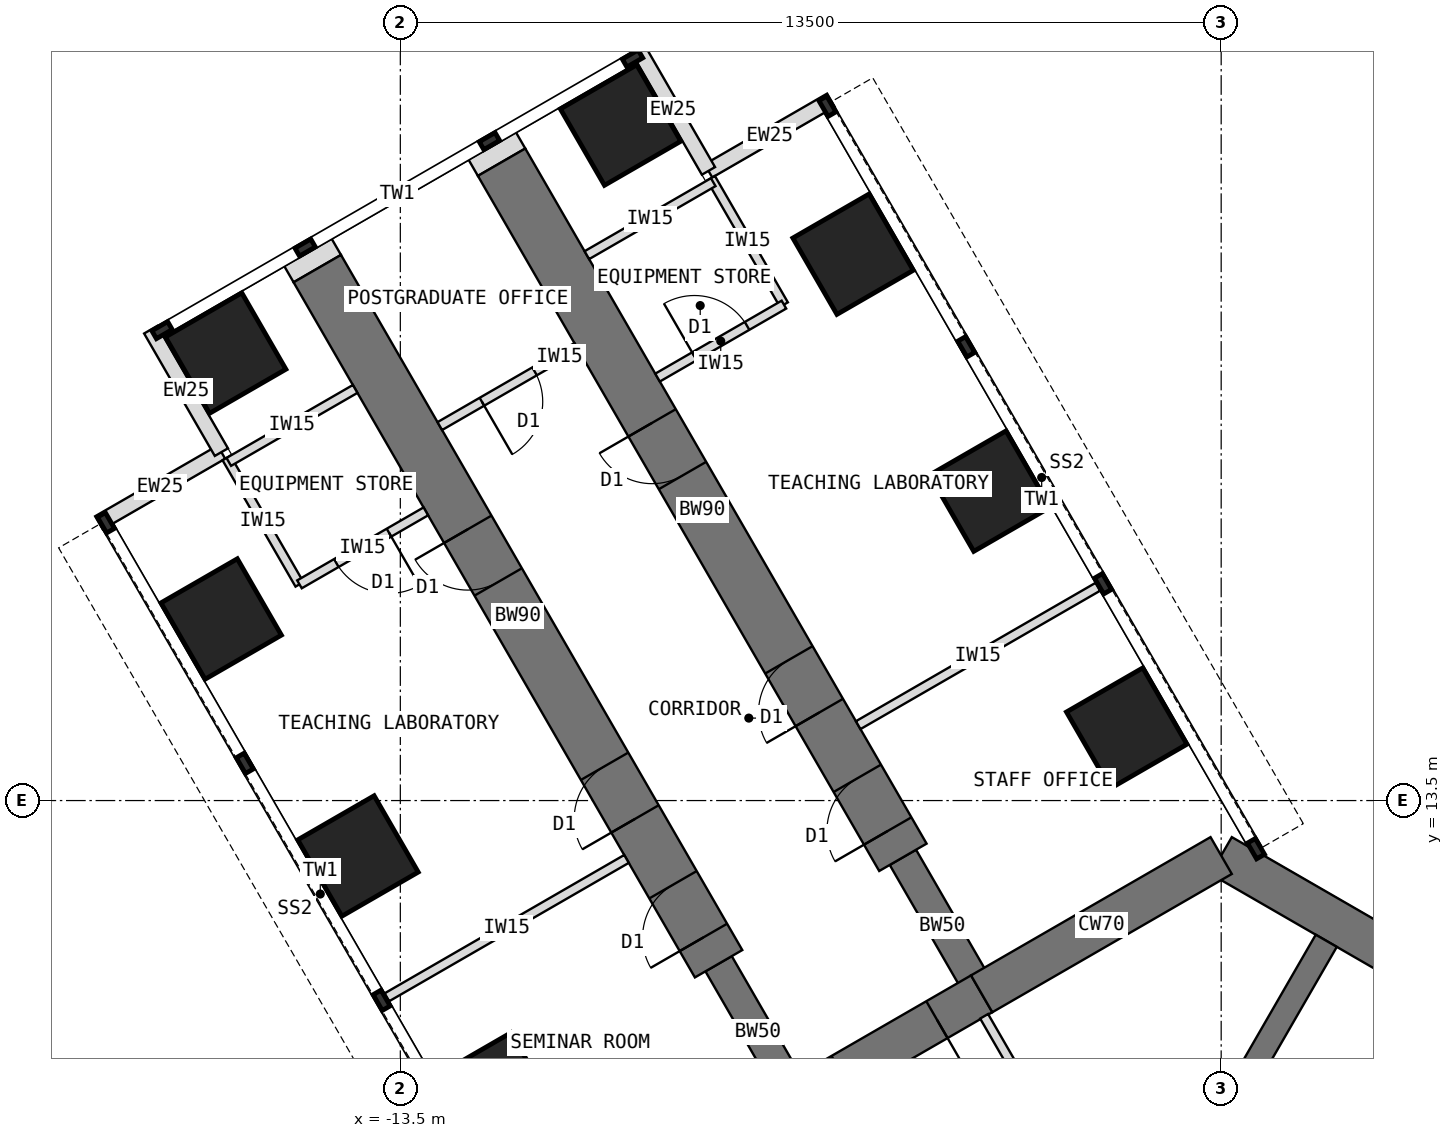
"""IFC4 building model, lengths in metres.
Left out: names, types, materials, properties, quantities, classifications, styles, units other than length and angle.
Written with IfcOpenShell. Run it as: python <this file> out.ifc"""

import sys

from ifc_helpers import new_model, si_unit, direction, frame, frame_2d, origin, origin_2d, place, context, subcontext, project, spatial, rectangle, extrude, element, fill, save


model = new_model("IFC4")
c1 = context("Model", 3, precision=1e-05, world=origin(), true_north=direction((0.0, 1.0)))
c2 = subcontext(c1, "Body", "Model", "MODEL_VIEW")
j1 = project(units=[si_unit("LENGTHUNIT", "METRE"), si_unit("PLANEANGLEUNIT", "RADIAN")], contexts=[c1])
p1 = place(None, origin())
s1 = spatial("IfcSite", under=j1, at=p1, CompositionType="ELEMENT")
p2 = place(p1, origin())
s2 = spatial("IfcBuilding", under=s1, at=p2, CompositionType="ELEMENT")
p3 = place(p2, frame((0.0, 0.0, 48.5)))
s3 = spatial("IfcBuildingStorey", under=s2, at=p3, CompositionType="ELEMENT", Elevation=48.5)
p4 = place(p3, frame((10.908, 6.298, 0.0), z_axis=(0.0, 0.0, 1.0), x_axis=(-0.866021940709, 0.500005998175, 0.0)))
e1 = element("IfcWall", 1, at=p4, inside=s3, PredefinedType="SHEAR", context=c2, shape_type="SweptSolid", body=[
    extrude(rectangle(XDim=12.596, YDim=0.7, at=frame_2d((6.298, 0.0))), origin(), (0.0, 0.0, 1.0), 4.0),
])
p5 = place(p3, frame((0.0, 12.596, 0.0), z_axis=(0.0, 0.0, 1.0), x_axis=(-0.866011268655, -0.500024481964, 0.0)))
e2 = element("IfcWall", 2, at=p5, inside=s3, PredefinedType="SHEAR", context=c2, shape_type="SweptSolid", body=[
    extrude(rectangle(XDim=4.548, YDim=0.7, at=frame_2d((2.274, 0.0))), origin(), (0.0, 0.0, 1.0), 4.0),
])
p6 = place(p3, frame((-3.939, 10.322, 0.0), z_axis=(0.0, 0.0, 1.0), x_axis=(-0.866019471182, -0.500010275428, 0.0)))
e3 = element("IfcWall", 3, at=p6, inside=s3, PredefinedType="SHEAR", context=c2, shape_type="SweptSolid", body=[
    extrude(rectangle(XDim=3.5, YDim=0.7, at=frame_2d((1.75, 0.0))), origin(), (0.0, 0.0, 1.0), 4.0),
])
p7 = place(p6, frame((0.85, 0.0, 0.0)))
e4 = element("IfcOpeningElement", 4, at=p7, cuts=e3, PredefinedType="OPENING", context=c2, shape_type="SweptSolid", body=[
    extrude(rectangle(XDim=1.8, YDim=2.1, at=frame_2d((0.9, 1.05))), frame((0.0, 0.36, 0.0), z_axis=(0.0, -1.0, 0.0), x_axis=(1.0, 0.0, 0.0)), (0.0, 0.0, 1.0), 0.72),
])
p8 = place(p3, frame((-6.97, 8.572, 0.0), z_axis=(0.0, 0.0, 1.0), x_axis=(-0.499988811324, 0.866031863473, 0.0)))
e5 = element("IfcWall", 5, at=p8, inside=s3, PredefinedType="SHEAR", context=c2, shape_type="SweptSolid", body=[
    extrude(rectangle(XDim=2.592, YDim=0.5, at=frame_2d((1.296, 0.0))), origin(), (0.0, 0.0, 1.0), 4.0),
])
p9 = place(p3, frame((-8.266, 10.816, 0.0), z_axis=(0.0, 0.0, 1.0), x_axis=(-0.499996231654, 0.866027579429, 0.0)))
e6 = element("IfcWall", 6, at=p9, inside=s3, PredefinedType="SHEAR", context=c2, shape_type="SweptSolid", body=[
    extrude(rectangle(XDim=13.2, YDim=0.9, at=frame_2d((6.6, 0.0))), origin(), (0.0, 0.0, 1.0), 4.0),
])
p10 = place(p9, frame((0.5, 0.0, 0.0)))
e7 = element("IfcOpeningElement", 7, at=p10, cuts=e6, PredefinedType="OPENING", context=c2, shape_type="SweptSolid", body=[
    extrude(rectangle(XDim=1.0, YDim=2.1, at=frame_2d((0.5, 1.05))), frame((0.0, 0.46, 0.0), z_axis=(0.0, -1.0, 0.0), x_axis=(1.0, 0.0, 0.0)), (0.0, 0.0, 1.0), 0.92),
])
p11 = place(p9, frame((2.75, 0.0, 0.0)))
e8 = element("IfcOpeningElement", 8, at=p11, cuts=e6, PredefinedType="OPENING", context=c2, shape_type="SweptSolid", body=[
    extrude(rectangle(XDim=1.0, YDim=2.1, at=frame_2d((0.5, 1.05))), frame((0.0, 0.46, 0.0), z_axis=(0.0, -1.0, 0.0), x_axis=(1.0, 0.0, 0.0)), (0.0, 0.0, 1.0), 0.92),
])
p12 = place(p9, frame((7.25, 0.0, 0.0)))
e9 = element("IfcOpeningElement", 9, at=p12, cuts=e6, PredefinedType="OPENING", context=c2, shape_type="SweptSolid", body=[
    extrude(rectangle(XDim=1.0, YDim=2.1, at=frame_2d((0.5, 1.05))), frame((0.0, 0.46, 0.0), z_axis=(0.0, -1.0, 0.0), x_axis=(1.0, 0.0, 0.0)), (0.0, 0.0, 1.0), 0.92),
])
p13 = place(p3, frame((-3.939, 10.322, 0.0), z_axis=(0.0, 0.0, 1.0), x_axis=(-0.499918158782, 0.866072649678, 0.0)))
e10 = element("IfcWall", 10, at=p13, inside=s3, PredefinedType="SHEAR", context=c2, shape_type="SweptSolid", body=[
    extrude(rectangle(XDim=2.592, YDim=0.5, at=frame_2d((1.296, 0.0))), origin(), (0.0, 0.0, 1.0), 4.0),
])
p14 = place(p3, frame((-5.234, 12.566, 0.0), z_axis=(0.0, 0.0, 1.0), x_axis=(-0.500010103361, 0.866019570528, 0.0)))
e11 = element("IfcWall", 11, at=p14, inside=s3, PredefinedType="SHEAR", context=c2, shape_type="SweptSolid", body=[
    extrude(rectangle(XDim=13.2, YDim=0.9, at=frame_2d((6.6, 0.0))), origin(), (0.0, 0.0, 1.0), 4.0),
])
p15 = place(p14, frame((0.5, 0.0, 0.0)))
e12 = element("IfcOpeningElement", 12, at=p15, cuts=e11, PredefinedType="OPENING", context=c2, shape_type="SweptSolid", body=[
    extrude(rectangle(XDim=1.0, YDim=2.1, at=frame_2d((0.5, 1.05))), frame((0.0, 0.46, 0.0), z_axis=(0.0, -1.0, 0.0), x_axis=(1.0, 0.0, 0.0)), (0.0, 0.0, 1.0), 0.92),
])
p16 = place(p14, frame((2.75, 0.0, 0.0)))
e13 = element("IfcOpeningElement", 13, at=p16, cuts=e11, PredefinedType="OPENING", context=c2, shape_type="SweptSolid", body=[
    extrude(rectangle(XDim=1.0, YDim=2.1, at=frame_2d((0.5, 1.05))), frame((0.0, 0.46, 0.0), z_axis=(0.0, -1.0, 0.0), x_axis=(1.0, 0.0, 0.0)), (0.0, 0.0, 1.0), 0.92),
])
p17 = place(p14, frame((7.25, 0.0, 0.0)))
e14 = element("IfcOpeningElement", 14, at=p17, cuts=e11, PredefinedType="OPENING", context=c2, shape_type="SweptSolid", body=[
    extrude(rectangle(XDim=1.0, YDim=2.1, at=frame_2d((0.5, 1.05))), frame((0.0, 0.46, 0.0), z_axis=(0.0, -1.0, 0.0), x_axis=(1.0, 0.0, 0.0)), (0.0, 0.0, 1.0), 0.92),
])
for number, where, z_axis, x_axis in (
    (15, (-11.946, 8.691, 0.0), (0.0, 0.0, 1.0), (0.866, 0.5, 0.0)),
    (16, (-1.554, 14.691, 0.0), (0.0, 0.0, 1.0), (0.866, 0.5, 0.0)),
    (17, (-14.196, 12.588, 0.0), (0.0, 0.0, 1.0), (0.866, 0.5, 0.0)),
    (18, (-3.804, 18.588, 0.0), (0.0, 0.0, 1.0), (0.866, 0.5, 0.0)),
    (19, (-16.446, 16.486, 0.0), (0.0, 0.0, 1.0), (0.866, 0.5, 0.0)),
    (20, (-6.054, 22.486, 0.0), (0.0, 0.0, 1.0), (0.866, 0.5, 0.0)),
    (21, (-16.373, 20.858, 0.0), (0.0, 0.0, 1.0), (0.866, 0.5, 0.0)),
    (22, (-9.877, 24.608, 0.0), (0.0, 0.0, 1.0), (0.866, 0.5, 0.0)),
):
    element("IfcColumn", number, at=place(p3, frame(where, z_axis=z_axis, x_axis=x_axis)), inside=s3, PredefinedType="COLUMN", context=c2, shape_type="SweptSolid", body=[
        extrude(rectangle(XDim=1.45, YDim=1.45, at=origin_2d()), origin(), (0.0, 0.0, 1.0), 4.0),
    ])
for number, where, z_axis, x_axis in (
    (23, (-18.456, 18.067, 0.0), (0.0, 0.0, 1.0), (0.866, 0.5, 0.0)),
    (24, (-16.443, 19.23, 0.0), (0.0, 0.0, 1.0), (-0.5, 0.866, 0.0)),
    (25, (-6.419, 25.017, 0.0), (0.0, 0.0, 1.0), (-0.866, -0.5, 0.0)),
    (26, (-8.432, 23.855, 0.0), (0.0, 0.0, 1.0), (-0.5, 0.866, 0.0)),
):
    element("IfcWall", number, at=place(p3, frame(where, z_axis=z_axis, x_axis=x_axis)), inside=s3, PredefinedType="STANDARD", context=c2, shape_type="SweptSolid", body=[
        extrude(rectangle(XDim=2.325, YDim=0.25, at=frame_2d((1.163, 0.0))), origin(), (0.0, 0.0, 1.0), 3.8),
    ])
for number, where, z_axis, x_axis in (
    (27, (-14.865, 22.248, 0.0), (0.0, 0.0, 1.0), (-0.5, 0.866, 0.0)),
    (28, (-11.834, 23.998, 0.0), (0.0, 0.0, 1.0), (-0.5, 0.866, 0.0)),
):
    element("IfcWall", number, at=place(p3, frame(where, z_axis=z_axis, x_axis=x_axis)), inside=s3, PredefinedType="PARTITIONING", context=c2, shape_type="SweptSolid", body=[
        extrude(rectangle(XDim=0.31, YDim=0.9, at=frame_2d((0.155, 0.0))), origin(), (0.0, 0.0, 1.0), 3.8),
    ])
p18 = place(p3, frame((-1.201, 6.12, 0.0), z_axis=(0.0, 0.0, 1.0), x_axis=(0.500002627198, 0.866023886965, 0.0)))
e29 = element("IfcWall", 29, at=p18, inside=s3, PredefinedType="SHEAR", context=c2, shape_type="SweptSolid", body=[
    extrude(rectangle(XDim=5.858, YDim=0.4, at=frame_2d((2.929, 0.0))), origin(), (0.0, 0.0, 1.0), 4.0),
])
p19 = place(p3, frame((-9.78, 12.54, 0.0), z_axis=(0.0, 0.0, 1.0), x_axis=(-0.866035472144, -0.499982560684, 0.0)))
e30 = element("IfcWall", 30, at=p19, inside=s3, PredefinedType="PARTITIONING", context=c2, shape_type="SweptSolid", body=[
    extrude(rectangle(XDim=4.55, YDim=0.15, at=frame_2d((2.275, 0.0))), origin(), (0.0, 0.0, 1.0), 3.8),
])
p20 = place(p3, frame((-15.159, 17.056, 0.0), z_axis=(0.0, 0.0, 1.0), x_axis=(-0.500001309137, 0.866024647952, 0.0)))
e31 = element("IfcWall", 31, at=p20, inside=s3, PredefinedType="PARTITIONING", context=c2, shape_type="SweptSolid", body=[
    extrude(rectangle(XDim=2.4, YDim=0.15, at=frame_2d((1.2, 0.0))), origin(), (0.0, 0.0, 1.0), 3.8),
])
p21 = place(p3, frame((-13.08, 18.256, 0.0), z_axis=(0.0, 0.0, 1.0), x_axis=(-0.866024647952, -0.500001309137, 0.0)))
e32 = element("IfcWall", 32, at=p21, inside=s3, PredefinedType="PARTITIONING", context=c2, shape_type="SweptSolid", body=[
    extrude(rectangle(XDim=2.4, YDim=0.15, at=frame_2d((1.2, 0.0))), origin(), (0.0, 0.0, 1.0), 3.8),
])
p22 = place(p21, frame((0.7, 0.0, 0.0)))
e33 = element("IfcOpeningElement", 33, at=p22, cuts=e32, PredefinedType="OPENING", context=c2, shape_type="SweptSolid", body=[
    extrude(rectangle(XDim=1.0, YDim=2.1, at=frame_2d((0.5, 1.05))), frame((0.0, 0.085, 0.0), z_axis=(0.0, -1.0, 0.0), x_axis=(1.0, 0.0, 0.0)), (0.0, 0.0, 1.0), 0.17),
])
p23 = place(p3, frame((-14.243, 20.269, 0.0), z_axis=(0.0, 0.0, 1.0), x_axis=(-0.866006032174, -0.500033551112, 0.0)))
e34 = element("IfcWall", 34, at=p23, inside=s3, PredefinedType="PARTITIONING", context=c2, shape_type="SweptSolid", body=[
    extrude(rectangle(XDim=2.4, YDim=0.15, at=frame_2d((1.2, 0.0))), origin(), (0.0, 0.0, 1.0), 3.8),
])
p24 = place(p3, frame((-5.97, 14.74, 0.0), z_axis=(0.0, 0.0, 1.0), x_axis=(0.866035472144, 0.499982560684, 0.0)))
e35 = element("IfcWall", 35, at=p24, inside=s3, PredefinedType="PARTITIONING", context=c2, shape_type="SweptSolid", body=[
    extrude(rectangle(XDim=4.55, YDim=0.15, at=frame_2d((2.275, 0.0))), origin(), (0.0, 0.0, 1.0), 3.8),
])
p25 = place(p3, frame((-7.191, 21.656, 0.0), z_axis=(0.0, 0.0, 1.0), x_axis=(-0.500077600433, 0.865980596518, 0.0)))
e36 = element("IfcWall", 36, at=p25, inside=s3, PredefinedType="PARTITIONING", context=c2, shape_type="SweptSolid", body=[
    extrude(rectangle(XDim=2.4, YDim=0.15, at=frame_2d((1.2, 0.0))), origin(), (0.0, 0.0, 1.0), 3.8),
])
p26 = place(p3, frame((-9.27, 20.456, 0.0), z_axis=(0.0, 0.0, 1.0), x_axis=(0.866006032174, 0.500033551112, 0.0)))
e37 = element("IfcWall", 37, at=p26, inside=s3, PredefinedType="PARTITIONING", context=c2, shape_type="SweptSolid", body=[
    extrude(rectangle(XDim=2.4, YDim=0.15, at=frame_2d((1.2, 0.0))), origin(), (0.0, 0.0, 1.0), 3.8),
])
p27 = place(p26, frame((0.7, 0.0, 0.0)))
e38 = element("IfcOpeningElement", 38, at=p27, cuts=e37, PredefinedType="OPENING", context=c2, shape_type="SweptSolid", body=[
    extrude(rectangle(XDim=1.0, YDim=2.1, at=frame_2d((0.5, 1.05))), frame((0.0, 0.085, 0.0), z_axis=(0.0, -1.0, 0.0), x_axis=(1.0, 0.0, 0.0)), (0.0, 0.0, 1.0), 0.17),
])
p28 = place(p3, frame((-10.432, 22.469, 0.0), z_axis=(0.0, 0.0, 1.0), x_axis=(0.866024647952, 0.500001309137, 0.0)))
e39 = element("IfcWall", 39, at=p28, inside=s3, PredefinedType="PARTITIONING", context=c2, shape_type="SweptSolid", body=[
    extrude(rectangle(XDim=2.4, YDim=0.15, at=frame_2d((1.2, 0.0))), origin(), (0.0, 0.0, 1.0), 3.8),
])
p29 = place(p3, frame((-3.898, 9.952, 0.0), z_axis=(0.0, 0.0, 1.0), x_axis=(0.499999927604, -0.866025445582, 0.0)))
e40 = element("IfcWall", 40, at=p29, inside=s3, PredefinedType="PARTITIONING", context=c2, shape_type="SweptSolid", body=[
    extrude(rectangle(XDim=4.468, YDim=0.15, at=frame_2d((2.234, 0.0))), origin(), (0.0, 0.0, 1.0), 3.8),
])
p30 = place(p29, frame((1.724, 0.0, 0.0)))
e41 = element("IfcOpeningElement", 41, at=p30, cuts=e40, PredefinedType="OPENING", context=c2, shape_type="SweptSolid", body=[
    extrude(rectangle(XDim=1.0, YDim=2.1, at=frame_2d((0.5, 1.05))), frame((0.0, 0.085, 0.0), z_axis=(0.0, -1.0, 0.0), x_axis=(1.0, 0.0, 0.0)), (0.0, 0.0, 1.0), 0.17),
])
p31 = place(p3, frame((-10.599, 20.958, 0.0), z_axis=(0.0, 0.0, 1.0), x_axis=(-0.866021400173, -0.500006934395, 0.0)))
e42 = element("IfcWall", 42, at=p31, inside=s3, PredefinedType="PARTITIONING", context=c2, shape_type="SweptSolid", body=[
    extrude(rectangle(XDim=2.6, YDim=0.15, at=frame_2d((1.3, 0.0))), origin(), (0.0, 0.0, 1.0), 3.8),
])
p32 = place(p31, frame((0.8, 0.0, 0.0)))
e43 = element("IfcOpeningElement", 43, at=p32, cuts=e42, PredefinedType="OPENING", context=c2, shape_type="SweptSolid", body=[
    extrude(rectangle(XDim=1.0, YDim=2.1, at=frame_2d((0.5, 1.05))), frame((0.0, 0.085, 0.0), z_axis=(0.0, -1.0, 0.0), x_axis=(1.0, 0.0, 0.0)), (0.0, 0.0, 1.0), 0.17),
])
p33 = place(p7, origin())
e44 = element("IfcDoor", 44, at=p33, inside=s3, OperationType="DOUBLE_DOOR_DOUBLE_SWING", PredefinedType="DOOR", context=c2, shape_type="SweptSolid", body=[
    extrude(rectangle(XDim=1.72, YDim=2.06, at=frame_2d((0.9, 1.03))), frame((0.0, 0.025, 0.0), z_axis=(0.0, -1.0, 0.0), x_axis=(1.0, 0.0, 0.0)), (0.0, 0.0, 1.0), 0.05),
    extrude(rectangle(XDim=0.04, YDim=2.1, at=frame_2d((0.02, 1.05))), frame((0.0, 0.35, 0.0), z_axis=(0.0, -1.0, 0.0), x_axis=(1.0, 0.0, 0.0)), (0.0, 0.0, 1.0), 0.699),
    extrude(rectangle(XDim=0.04, YDim=2.1, at=frame_2d((1.78, 1.05))), frame((0.0, 0.35, 0.0), z_axis=(0.0, -1.0, 0.0), x_axis=(1.0, 0.0, 0.0)), (0.0, 0.0, 1.0), 0.699),
    extrude(rectangle(XDim=1.72, YDim=0.04, at=frame_2d((0.9, 2.08))), frame((0.0, 0.35, 0.0), z_axis=(0.0, -1.0, 0.0), x_axis=(1.0, 0.0, 0.0)), (0.0, 0.0, 1.0), 0.699),
])
fill(e4, e44)
p34 = place(p22, origin())
e45 = element("IfcDoor", 45, at=p34, inside=s3, OperationType="SINGLE_SWING_LEFT", PredefinedType="DOOR", context=c2, shape_type="SweptSolid", body=[
    extrude(rectangle(XDim=1.0, YDim=2.1, at=frame_2d((0.5, 1.05))), frame((0.0, 0.025, 0.0), z_axis=(0.0, -1.0, 0.0), x_axis=(1.0, 0.0, 0.0)), (0.0, 0.0, 1.0), 0.05),
])
fill(e33, e45)
p35 = place(p27, origin())
e46 = element("IfcDoor", 46, at=p35, inside=s3, OperationType="SINGLE_SWING_LEFT", PredefinedType="DOOR", context=c2, shape_type="SweptSolid", body=[
    extrude(rectangle(XDim=1.0, YDim=2.1, at=frame_2d((0.5, 1.05))), frame((0.0, 0.025, 0.0), z_axis=(0.0, -1.0, 0.0), x_axis=(1.0, 0.0, 0.0)), (0.0, 0.0, 1.0), 0.05),
])
fill(e38, e46)
p36 = place(p32, origin())
e47 = element("IfcDoor", 47, at=p36, inside=s3, OperationType="SINGLE_SWING_RIGHT", PredefinedType="DOOR", context=c2, shape_type="SweptSolid", body=[
    extrude(rectangle(XDim=1.0, YDim=2.1, at=frame_2d((0.5, 1.05))), frame((0.0, 0.025, 0.0), z_axis=(0.0, -1.0, 0.0), x_axis=(1.0, 0.0, 0.0)), (0.0, 0.0, 1.0), 0.05),
])
fill(e43, e47)
p37 = place(p10, origin())
e48 = element("IfcDoor", 48, at=p37, inside=s3, OperationType="SINGLE_SWING_LEFT", PredefinedType="DOOR", context=c2, shape_type="SweptSolid", body=[
    extrude(rectangle(XDim=0.92, YDim=2.06, at=frame_2d((0.5, 1.03))), frame((0.0, 0.025, 0.0), z_axis=(0.0, -1.0, 0.0), x_axis=(1.0, 0.0, 0.0)), (0.0, 0.0, 1.0), 0.05),
    extrude(rectangle(XDim=0.04, YDim=2.1, at=frame_2d((0.02, 1.05))), frame((0.0, 0.45, 0.0), z_axis=(0.0, -1.0, 0.0), x_axis=(1.0, 0.0, 0.0)), (0.0, 0.0, 1.0), 0.899),
    extrude(rectangle(XDim=0.04, YDim=2.1, at=frame_2d((0.98, 1.05))), frame((0.0, 0.45, 0.0), z_axis=(0.0, -1.0, 0.0), x_axis=(1.0, 0.0, 0.0)), (0.0, 0.0, 1.0), 0.899),
    extrude(rectangle(XDim=0.92, YDim=0.04, at=frame_2d((0.5, 2.08))), frame((0.0, 0.45, 0.0), z_axis=(0.0, -1.0, 0.0), x_axis=(1.0, 0.0, 0.0)), (0.0, 0.0, 1.0), 0.899),
])
fill(e7, e48)
p38 = place(p11, origin())
e49 = element("IfcDoor", 49, at=p38, inside=s3, OperationType="SINGLE_SWING_LEFT", PredefinedType="DOOR", context=c2, shape_type="SweptSolid", body=[
    extrude(rectangle(XDim=0.92, YDim=2.06, at=frame_2d((0.5, 1.03))), frame((0.0, 0.025, 0.0), z_axis=(0.0, -1.0, 0.0), x_axis=(1.0, 0.0, 0.0)), (0.0, 0.0, 1.0), 0.05),
    extrude(rectangle(XDim=0.04, YDim=2.1, at=frame_2d((0.02, 1.05))), frame((0.0, 0.45, 0.0), z_axis=(0.0, -1.0, 0.0), x_axis=(1.0, 0.0, 0.0)), (0.0, 0.0, 1.0), 0.899),
    extrude(rectangle(XDim=0.04, YDim=2.1, at=frame_2d((0.98, 1.05))), frame((0.0, 0.45, 0.0), z_axis=(0.0, -1.0, 0.0), x_axis=(1.0, 0.0, 0.0)), (0.0, 0.0, 1.0), 0.899),
    extrude(rectangle(XDim=0.92, YDim=0.04, at=frame_2d((0.5, 2.08))), frame((0.0, 0.45, 0.0), z_axis=(0.0, -1.0, 0.0), x_axis=(1.0, 0.0, 0.0)), (0.0, 0.0, 1.0), 0.899),
])
fill(e8, e49)
p39 = place(p12, origin())
e50 = element("IfcDoor", 50, at=p39, inside=s3, OperationType="SINGLE_SWING_RIGHT", PredefinedType="DOOR", context=c2, shape_type="SweptSolid", body=[
    extrude(rectangle(XDim=0.92, YDim=2.06, at=frame_2d((0.5, 1.03))), frame((0.0, 0.025, 0.0), z_axis=(0.0, -1.0, 0.0), x_axis=(1.0, 0.0, 0.0)), (0.0, 0.0, 1.0), 0.05),
    extrude(rectangle(XDim=0.04, YDim=2.1, at=frame_2d((0.02, 1.05))), frame((0.0, 0.45, 0.0), z_axis=(0.0, -1.0, 0.0), x_axis=(1.0, 0.0, 0.0)), (0.0, 0.0, 1.0), 0.899),
    extrude(rectangle(XDim=0.04, YDim=2.1, at=frame_2d((0.98, 1.05))), frame((0.0, 0.45, 0.0), z_axis=(0.0, -1.0, 0.0), x_axis=(1.0, 0.0, 0.0)), (0.0, 0.0, 1.0), 0.899),
    extrude(rectangle(XDim=0.92, YDim=0.04, at=frame_2d((0.5, 2.08))), frame((0.0, 0.45, 0.0), z_axis=(0.0, -1.0, 0.0), x_axis=(1.0, 0.0, 0.0)), (0.0, 0.0, 1.0), 0.899),
])
fill(e9, e50)
p40 = place(p15, origin())
e51 = element("IfcDoor", 51, at=p40, inside=s3, OperationType="SINGLE_SWING_LEFT", PredefinedType="DOOR", context=c2, shape_type="SweptSolid", body=[
    extrude(rectangle(XDim=0.92, YDim=2.06, at=frame_2d((0.5, 1.03))), frame((0.0, 0.025, 0.0), z_axis=(0.0, -1.0, 0.0), x_axis=(1.0, 0.0, 0.0)), (0.0, 0.0, 1.0), 0.05),
    extrude(rectangle(XDim=0.04, YDim=2.1, at=frame_2d((0.02, 1.05))), frame((0.0, 0.45, 0.0), z_axis=(0.0, -1.0, 0.0), x_axis=(1.0, 0.0, 0.0)), (0.0, 0.0, 1.0), 0.899),
    extrude(rectangle(XDim=0.04, YDim=2.1, at=frame_2d((0.98, 1.05))), frame((0.0, 0.45, 0.0), z_axis=(0.0, -1.0, 0.0), x_axis=(1.0, 0.0, 0.0)), (0.0, 0.0, 1.0), 0.899),
    extrude(rectangle(XDim=0.92, YDim=0.04, at=frame_2d((0.5, 2.08))), frame((0.0, 0.45, 0.0), z_axis=(0.0, -1.0, 0.0), x_axis=(1.0, 0.0, 0.0)), (0.0, 0.0, 1.0), 0.899),
])
fill(e12, e51)
p41 = place(p16, origin())
e52 = element("IfcDoor", 52, at=p41, inside=s3, OperationType="SINGLE_SWING_LEFT", PredefinedType="DOOR", context=c2, shape_type="SweptSolid", body=[
    extrude(rectangle(XDim=0.92, YDim=2.06, at=frame_2d((0.5, 1.03))), frame((0.0, 0.025, 0.0), z_axis=(0.0, -1.0, 0.0), x_axis=(1.0, 0.0, 0.0)), (0.0, 0.0, 1.0), 0.05),
    extrude(rectangle(XDim=0.04, YDim=2.1, at=frame_2d((0.02, 1.05))), frame((0.0, 0.45, 0.0), z_axis=(0.0, -1.0, 0.0), x_axis=(1.0, 0.0, 0.0)), (0.0, 0.0, 1.0), 0.899),
    extrude(rectangle(XDim=0.04, YDim=2.1, at=frame_2d((0.98, 1.05))), frame((0.0, 0.45, 0.0), z_axis=(0.0, -1.0, 0.0), x_axis=(1.0, 0.0, 0.0)), (0.0, 0.0, 1.0), 0.899),
    extrude(rectangle(XDim=0.92, YDim=0.04, at=frame_2d((0.5, 2.08))), frame((0.0, 0.45, 0.0), z_axis=(0.0, -1.0, 0.0), x_axis=(1.0, 0.0, 0.0)), (0.0, 0.0, 1.0), 0.899),
])
fill(e13, e52)
p42 = place(p17, origin())
e53 = element("IfcDoor", 53, at=p42, inside=s3, OperationType="SINGLE_SWING_RIGHT", PredefinedType="DOOR", context=c2, shape_type="SweptSolid", body=[
    extrude(rectangle(XDim=0.92, YDim=2.06, at=frame_2d((0.5, 1.03))), frame((0.0, 0.025, 0.0), z_axis=(0.0, -1.0, 0.0), x_axis=(1.0, 0.0, 0.0)), (0.0, 0.0, 1.0), 0.05),
    extrude(rectangle(XDim=0.04, YDim=2.1, at=frame_2d((0.02, 1.05))), frame((0.0, 0.45, 0.0), z_axis=(0.0, -1.0, 0.0), x_axis=(1.0, 0.0, 0.0)), (0.0, 0.0, 1.0), 0.899),
    extrude(rectangle(XDim=0.04, YDim=2.1, at=frame_2d((0.98, 1.05))), frame((0.0, 0.45, 0.0), z_axis=(0.0, -1.0, 0.0), x_axis=(1.0, 0.0, 0.0)), (0.0, 0.0, 1.0), 0.899),
    extrude(rectangle(XDim=0.92, YDim=0.04, at=frame_2d((0.5, 2.08))), frame((0.0, 0.45, 0.0), z_axis=(0.0, -1.0, 0.0), x_axis=(1.0, 0.0, 0.0)), (0.0, 0.0, 1.0), 0.899),
])
fill(e14, e53)
save(model, sys.argv[1])
